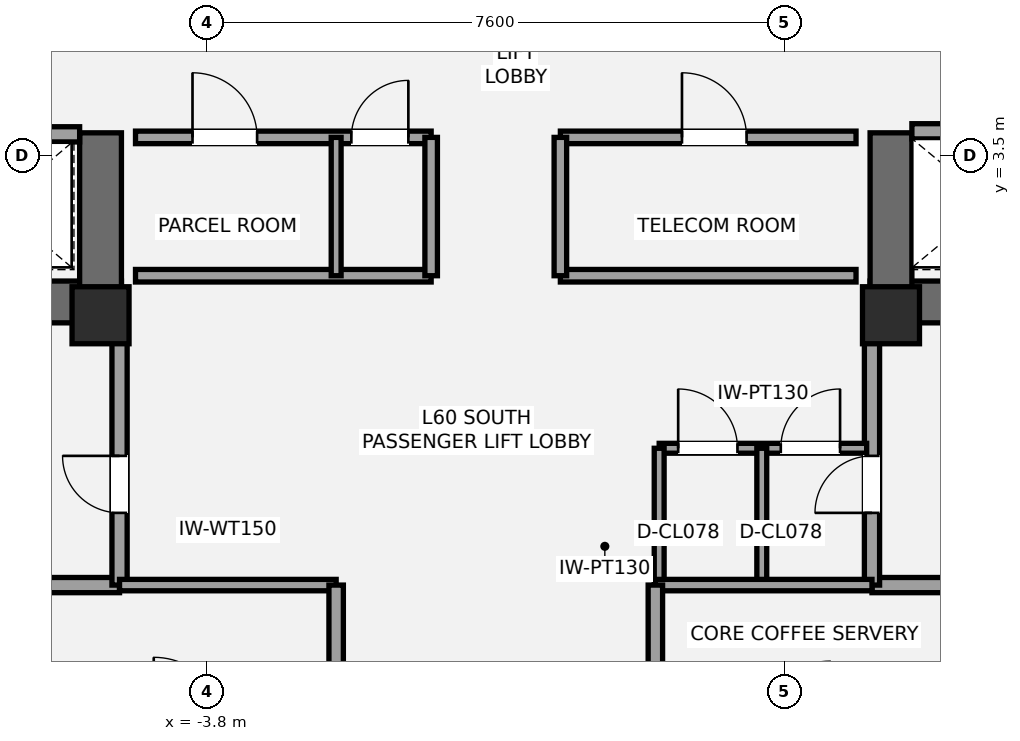
"""IFC4 building model, lengths in metres.
Left out: names, types, materials, properties, quantities, classifications, styles, units other than length and angle.
Written with IfcOpenShell. Run it as: python <this file> out.ifc"""

import sys

from ifc_helpers import new_model, si_unit, direction, frame, frame_2d, origin, origin_2d, place, context, subcontext, project, spatial, rectangle, extrude, element, fill, save


model = new_model("IFC4")
c1 = context("Model", 3, precision=1e-05, world=origin(), true_north=direction((0.0, 1.0)))
c2 = subcontext(c1, "Body", "Model", "MODEL_VIEW")
j1 = project(units=[si_unit("LENGTHUNIT", "METRE"), si_unit("PLANEANGLEUNIT", "RADIAN")], contexts=[c1])
p1 = place(None, origin())
s1 = spatial("IfcSite", under=j1, at=p1, CompositionType="ELEMENT")
p2 = place(p1, origin())
s2 = spatial("IfcBuilding", under=s1, at=p2, CompositionType="ELEMENT")
p3 = place(p2, frame((0.0, 0.0, 216.3)))
s3 = spatial("IfcBuildingStorey", under=s2, at=p3, CompositionType="ELEMENT", Elevation=216.3)
p4 = place(p3, frame((-4.925, 1.575, 0.0), z_axis=(0.0, 0.0, 1.0), x_axis=(-1.0, 0.0, 0.0)))
e1 = element("IfcWall", 1, at=p4, inside=s3, PredefinedType="SHEAR", context=c2, shape_type="SweptSolid", body=[
    extrude(rectangle(XDim=8.775, YDim=0.55, at=frame_2d((4.387, 0.0))), origin(), (0.0, 0.0, 1.0), 3.15),
])
p5 = place(p4, frame((5.375, 0.0, 0.0)))
e2 = element("IfcOpeningElement", 2, at=p5, cuts=e1, PredefinedType="OPENING", context=c2, shape_type="SweptSolid", body=[
    extrude(rectangle(XDim=1.05, YDim=2.15, at=frame_2d((0.525, 1.075))), frame((0.0, 0.285, 0.0), z_axis=(0.0, -1.0, 0.0), x_axis=(1.0, 0.0, 0.0)), (0.0, 0.0, 1.0), 0.57),
])
p6 = place(p4, frame((3.705, 0.0, 0.0)))
e3 = element("IfcOpeningElement", 3, at=p6, cuts=e1, PredefinedType="OPENING", context=c2, shape_type="SweptSolid", body=[
    extrude(rectangle(XDim=1.1, YDim=2.2, at=frame_2d((0.55, 1.1))), frame((0.0, 0.285, 0.0), z_axis=(0.0, -1.0, 0.0), x_axis=(1.0, 0.0, 0.0)), (0.0, 0.0, 1.0), 0.57),
])
p7 = place(p3, frame((-5.2, 1.3, 0.0), z_axis=(0.0, 0.0, 1.0), x_axis=(0.0, 1.0, 0.0)))
e4 = element("IfcWall", 4, at=p7, inside=s3, PredefinedType="SHEAR", context=c2, shape_type="SweptSolid", body=[
    extrude(rectangle(XDim=2.5, YDim=0.55, at=frame_2d((1.25, 0.0))), origin(), (0.0, 0.0, 1.0), 3.15),
])
p8 = place(p3, frame((13.7, 1.575, 0.0), z_axis=(0.0, 0.0, 1.0), x_axis=(-1.0, 0.0, 0.0)))
e5 = element("IfcWall", 5, at=p8, inside=s3, PredefinedType="SHEAR", context=c2, shape_type="SweptSolid", body=[
    extrude(rectangle(XDim=8.775, YDim=0.55, at=frame_2d((4.387, 0.0))), origin(), (0.0, 0.0, 1.0), 3.15),
])
p9 = place(p8, frame((2.35, 0.0, 0.0)))
e6 = element("IfcOpeningElement", 6, at=p9, cuts=e5, PredefinedType="OPENING", context=c2, shape_type="SweptSolid", body=[
    extrude(rectangle(XDim=1.05, YDim=2.15, at=frame_2d((0.525, 1.075))), frame((0.0, 0.285, 0.0), z_axis=(0.0, -1.0, 0.0), x_axis=(1.0, 0.0, 0.0)), (0.0, 0.0, 1.0), 0.57),
])
p10 = place(p8, frame((4.35, 0.0, 0.0)))
e7 = element("IfcOpeningElement", 7, at=p10, cuts=e5, PredefinedType="OPENING", context=c2, shape_type="SweptSolid", body=[
    extrude(rectangle(XDim=1.1, YDim=2.2, at=frame_2d((0.55, 1.1))), frame((0.0, 0.285, 0.0), z_axis=(0.0, -1.0, 0.0), x_axis=(1.0, 0.0, 0.0)), (0.0, 0.0, 1.0), 0.57),
])
p11 = place(p3, frame((5.2, 1.3, 0.0), z_axis=(0.0, 0.0, 1.0), x_axis=(0.0, 1.0, 0.0)))
e8 = element("IfcWall", 8, at=p11, inside=s3, PredefinedType="SHEAR", context=c2, shape_type="SweptSolid", body=[
    extrude(rectangle(XDim=2.5, YDim=0.55, at=frame_2d((1.25, 0.0))), origin(), (0.0, 0.0, 1.0), 3.15),
])
for number, where, z_axis, x_axis in (
    (9, (-5.2, 1.4, 0.0), (0.0, 0.0, 1.0), (1.0, 0.0, 0.0)),
    (10, (5.2, 1.4, 0.0), (0.0, 0.0, 1.0), (1.0, 0.0, 0.0)),
):
    element("IfcColumn", number, at=place(p3, frame(where, z_axis=z_axis, x_axis=x_axis)), inside=s3, PredefinedType="PILASTER", context=c2, shape_type="SweptSolid", body=[
        extrude(rectangle(XDim=0.75, YDim=0.75, at=origin_2d()), origin(), (0.0, 0.0, 1.0), 3.15),
    ])
p12 = place(p3, frame((-7.2, -2.15, 0.0), z_axis=(0.0, 0.0, 1.0), x_axis=(1.0, 0.0, 0.0)))
e11 = element("IfcWall", 11, at=p12, inside=s3, PredefinedType="SOLIDWALL", context=c2, shape_type="SweptSolid", body=[
    extrude(rectangle(XDim=2.25, YDim=0.2, at=frame_2d((1.125, 0.0))), origin(), (0.0, 0.0, 1.0), 2.423),
])
p13 = place(p3, frame((-4.95, -2.15, 0.0), z_axis=(0.0, 0.0, 1.0), x_axis=(0.0, 1.0, 0.0)))
e12 = element("IfcWall", 12, at=p13, inside=s3, PredefinedType="SOLIDWALL", context=c2, shape_type="SweptSolid", body=[
    extrude(rectangle(XDim=3.5, YDim=0.2, at=frame_2d((1.75, 0.0))), origin(), (0.0, 0.0, 1.0), 2.423),
])
p14 = place(p13, frame((0.95, 0.0, 0.0)))
e13 = element("IfcOpeningElement", 13, at=p14, cuts=e12, PredefinedType="OPENING", context=c2, shape_type="SweptSolid", body=[
    extrude(rectangle(XDim=0.75, YDim=2.1, at=frame_2d((0.375, 1.05))), frame((0.0, 0.11, 0.0), z_axis=(0.0, -1.0, 0.0), x_axis=(1.0, 0.0, 0.0)), (0.0, 0.0, 1.0), 0.22),
])
p15 = place(p3, frame((4.95, -2.15, 0.0), z_axis=(0.0, 0.0, 1.0), x_axis=(1.0, 0.0, 0.0)))
e14 = element("IfcWall", 14, at=p15, inside=s3, PredefinedType="SOLIDWALL", context=c2, shape_type="SweptSolid", body=[
    extrude(rectangle(XDim=2.25, YDim=0.2, at=frame_2d((1.125, 0.0))), origin(), (0.0, 0.0, 1.0), 2.97),
])
p16 = place(p3, frame((4.95, -2.15, 0.0), z_axis=(0.0, 0.0, 1.0), x_axis=(0.0, 1.0, 0.0)))
e15 = element("IfcWall", 15, at=p16, inside=s3, PredefinedType="SOLIDWALL", context=c2, shape_type="SweptSolid", body=[
    extrude(rectangle(XDim=3.5, YDim=0.2, at=frame_2d((1.75, 0.0))), origin(), (0.0, 0.0, 1.0), 2.423),
])
p17 = place(p16, frame((0.95, 0.0, 0.0)))
e16 = element("IfcOpeningElement", 16, at=p17, cuts=e15, PredefinedType="OPENING", context=c2, shape_type="SweptSolid", body=[
    extrude(rectangle(XDim=0.75, YDim=2.1, at=frame_2d((0.375, 1.05))), frame((0.0, 0.11, 0.0), z_axis=(0.0, -1.0, 0.0), x_axis=(1.0, 0.0, 0.0)), (0.0, 0.0, 1.0), 0.22),
])
p18 = place(p3, frame((2.15, -0.35, 0.0), z_axis=(0.0, 0.0, 1.0), x_axis=(1.0, 0.0, 0.0)))
e17 = element("IfcWall", 17, at=p18, inside=s3, PredefinedType="PARTITIONING", context=c2, shape_type="SweptSolid", body=[
    extrude(rectangle(XDim=2.73, YDim=0.13, at=frame_2d((1.365, 0.0))), origin(), (0.0, 0.0, 1.0), 2.97),
])
p19 = place(p18, frame((0.25, 0.0, 0.0)))
e18 = element("IfcOpeningElement", 18, at=p19, cuts=e17, PredefinedType="OPENING", context=c2, shape_type="SweptSolid", body=[
    extrude(rectangle(XDim=0.78, YDim=2.1, at=frame_2d((0.39, 1.05))), frame((0.0, 0.075, 0.0), z_axis=(0.0, -1.0, 0.0), x_axis=(1.0, 0.0, 0.0)), (0.0, 0.0, 1.0), 0.15),
])
p20 = place(p18, frame((1.6, 0.0, 0.0)))
e19 = element("IfcOpeningElement", 19, at=p20, cuts=e17, PredefinedType="OPENING", context=c2, shape_type="SweptSolid", body=[
    extrude(rectangle(XDim=0.78, YDim=2.1, at=frame_2d((0.39, 1.05))), frame((0.0, 0.075, 0.0), z_axis=(0.0, -1.0, 0.0), x_axis=(1.0, 0.0, 0.0)), (0.0, 0.0, 1.0), 0.15),
])
for number, where, z_axis, x_axis in (
    (20, (2.15, -2.15, 0.0), (0.0, 0.0, 1.0), (0.0, 1.0, 0.0)),
    (21, (3.5, -2.15, 0.0), (0.0, 0.0, 1.0), (0.0, 1.0, 0.0)),
):
    element("IfcWall", number, at=place(p3, frame(where, z_axis=z_axis, x_axis=x_axis)), inside=s3, PredefinedType="PARTITIONING", context=c2, shape_type="SweptSolid", body=[
        extrude(rectangle(XDim=1.8, YDim=0.13, at=frame_2d((0.9, 0.0))), origin(), (0.0, 0.0, 1.0), 2.97),
    ])
p21 = place(p3, frame((-9.78, 3.78, 0.0), z_axis=(0.0, 0.0, 1.0), x_axis=(1.0, 0.0, 0.0)))
e22 = element("IfcWall", 22, at=p21, inside=s3, PredefinedType="SOLIDWALL", context=c2, shape_type="SweptSolid", body=[
    extrude(rectangle(XDim=4.305, YDim=0.2, at=frame_2d((2.152, 0.0))), origin(), (0.0, 0.0, 1.0), 2.97),
])
p22 = place(p21, frame((2.72, 0.0, 0.0)))
e23 = element("IfcOpeningElement", 23, at=p22, cuts=e22, PredefinedType="OPENING", context=c2, shape_type="SweptSolid", body=[
    extrude(rectangle(XDim=1.1, YDim=2.2, at=frame_2d((0.55, 1.1))), frame((0.0, 0.11, 0.0), z_axis=(0.0, -1.0, 0.0), x_axis=(1.0, 0.0, 0.0)), (0.0, 0.0, 1.0), 0.22),
])
p23 = place(p3, frame((5.475, 3.82, 0.0), z_axis=(0.0, 0.0, 1.0), x_axis=(1.0, 0.0, 0.0)))
e24 = element("IfcWall", 24, at=p23, inside=s3, PredefinedType="SOLIDWALL", context=c2, shape_type="SweptSolid", body=[
    extrude(rectangle(XDim=4.305, YDim=0.2, at=frame_2d((2.152, 0.0))), origin(), (0.0, 0.0, 1.0), 2.97),
])
p24 = place(p23, frame((0.65, 0.0, 0.0)))
e25 = element("IfcOpeningElement", 25, at=p24, cuts=e24, PredefinedType="OPENING", context=c2, shape_type="SweptSolid", body=[
    extrude(rectangle(XDim=1.2, YDim=2.2, at=frame_2d((0.6, 1.1))), frame((0.0, 0.11, 0.0), z_axis=(0.0, -1.0, 0.0), x_axis=(1.0, 0.0, 0.0)), (0.0, 0.0, 1.0), 0.22),
])
p25 = place(p3, frame((-4.74, 1.92, 0.0), z_axis=(0.0, 0.0, 1.0), x_axis=(1.0, 0.0, 0.0)))
e26 = element("IfcWall", 26, at=p25, inside=s3, PredefinedType="PARTITIONING", context=c2, shape_type="SweptSolid", body=[
    extrude(rectangle(XDim=3.89, YDim=0.165, at=frame_2d((1.945, 0.0))), origin(), (0.0, 0.0, 1.0), 2.11),
])
p26 = place(p3, frame((-4.74, 3.74, 0.0), z_axis=(0.0, 0.0, 1.0), x_axis=(1.0, 0.0, 0.0)))
e27 = element("IfcWall", 27, at=p26, inside=s3, PredefinedType="PARTITIONING", context=c2, shape_type="SweptSolid", body=[
    extrude(rectangle(XDim=3.89, YDim=0.165, at=frame_2d((1.945, 0.0))), origin(), (0.0, 0.0, 1.0), 2.97),
])
p27 = place(p26, frame((0.75, 0.0, 0.0)))
e28 = element("IfcOpeningElement", 28, at=p27, cuts=e27, PredefinedType="OPENING", context=c2, shape_type="SweptSolid", body=[
    extrude(rectangle(XDim=0.85, YDim=2.1, at=frame_2d((0.425, 1.05))), frame((0.0, 0.093, 0.0), z_axis=(0.0, -1.0, 0.0), x_axis=(1.0, 0.0, 0.0)), (0.0, 0.0, 1.0), 0.185),
])
p28 = place(p26, frame((2.84, 0.0, 0.0)))
e29 = element("IfcOpeningElement", 29, at=p28, cuts=e27, PredefinedType="OPENING", context=c2, shape_type="SweptSolid", body=[
    extrude(rectangle(XDim=0.75, YDim=2.1, at=frame_2d((0.375, 1.05))), frame((0.0, 0.093, 0.0), z_axis=(0.0, -1.0, 0.0), x_axis=(1.0, 0.0, 0.0)), (0.0, 0.0, 1.0), 0.185),
])
p29 = place(p3, frame((-0.85, 1.92, 0.0), z_axis=(0.0, 0.0, 1.0), x_axis=(0.0, 1.0, 0.0)))
e30 = element("IfcWall", 30, at=p29, inside=s3, PredefinedType="PARTITIONING", context=c2, shape_type="SweptSolid", body=[
    extrude(rectangle(XDim=1.82, YDim=0.165, at=frame_2d((0.91, 0.0))), origin(), (0.0, 0.0, 1.0), 2.97),
])
p30 = place(p3, frame((0.85, 1.92, 0.0), z_axis=(0.0, 0.0, 1.0), x_axis=(1.0, 0.0, 0.0)))
e31 = element("IfcWall", 31, at=p30, inside=s3, PredefinedType="PARTITIONING", context=c2, shape_type="SweptSolid", body=[
    extrude(rectangle(XDim=3.89, YDim=0.165, at=frame_2d((1.945, 0.0))), origin(), (0.0, 0.0, 1.0), 2.11),
])
p31 = place(p3, frame((0.85, 3.74, 0.0), z_axis=(0.0, 0.0, 1.0), x_axis=(1.0, 0.0, 0.0)))
e32 = element("IfcWall", 32, at=p31, inside=s3, PredefinedType="PARTITIONING", context=c2, shape_type="SweptSolid", body=[
    extrude(rectangle(XDim=3.89, YDim=0.165, at=frame_2d((1.945, 0.0))), origin(), (0.0, 0.0, 1.0), 2.97),
])
p32 = place(p31, frame((1.6, 0.0, 0.0)))
e33 = element("IfcOpeningElement", 33, at=p32, cuts=e32, PredefinedType="OPENING", context=c2, shape_type="SweptSolid", body=[
    extrude(rectangle(XDim=0.85, YDim=2.1, at=frame_2d((0.425, 1.05))), frame((0.0, 0.093, 0.0), z_axis=(0.0, -1.0, 0.0), x_axis=(1.0, 0.0, 0.0)), (0.0, 0.0, 1.0), 0.185),
])
p33 = place(p3, frame((0.85, 1.92, 0.0), z_axis=(0.0, 0.0, 1.0), x_axis=(0.0, 1.0, 0.0)))
e34 = element("IfcWall", 34, at=p33, inside=s3, PredefinedType="PARTITIONING", context=c2, shape_type="SweptSolid", body=[
    extrude(rectangle(XDim=1.82, YDim=0.165, at=frame_2d((0.91, 0.0))), origin(), (0.0, 0.0, 1.0), 2.97),
])
p34 = place(p3, frame((-2.1, 1.92, 0.0), z_axis=(0.0, 0.0, 1.0), x_axis=(0.0, 1.0, 0.0)))
e35 = element("IfcWall", 35, at=p34, inside=s3, PredefinedType="PARTITIONING", context=c2, shape_type="SweptSolid", body=[
    extrude(rectangle(XDim=1.82, YDim=0.13, at=frame_2d((0.91, 0.0))), origin(), (0.0, 0.0, 1.0), 2.97),
])
p35 = place(p3, frame((-4.95, -2.15, 0.0), z_axis=(0.0, 0.0, 1.0), x_axis=(1.0, 0.0, 0.0)))
e36 = element("IfcWall", 36, at=p35, inside=s3, PredefinedType="PLUMBINGWALL", context=c2, shape_type="SweptSolid", body=[
    extrude(rectangle(XDim=2.85, YDim=0.15, at=frame_2d((1.425, 0.0))), origin(), (0.0, 0.0, 1.0), 2.97),
])
p36 = place(p3, frame((-2.1, -4.05, 0.0), z_axis=(0.0, 0.0, 1.0), x_axis=(0.0, 1.0, 0.0)))
e37 = element("IfcWall", 37, at=p36, inside=s3, PredefinedType="PLUMBINGWALL", context=c2, shape_type="SweptSolid", body=[
    extrude(rectangle(XDim=1.9, YDim=0.19, at=frame_2d((0.95, 0.0))), origin(), (0.0, 0.0, 1.0), 2.423),
])
p37 = place(p3, frame((2.1, -2.15, 0.0), z_axis=(0.0, 0.0, 1.0), x_axis=(1.0, 0.0, 0.0)))
e38 = element("IfcWall", 38, at=p37, inside=s3, PredefinedType="PLUMBINGWALL", context=c2, shape_type="SweptSolid", body=[
    extrude(rectangle(XDim=2.85, YDim=0.15, at=frame_2d((1.425, 0.0))), origin(), (0.0, 0.0, 1.0), 2.97),
])
p38 = place(p3, frame((2.1, -4.05, 0.0), z_axis=(0.0, 0.0, 1.0), x_axis=(0.0, 1.0, 0.0)))
e39 = element("IfcWall", 39, at=p38, inside=s3, PredefinedType="PLUMBINGWALL", context=c2, shape_type="SweptSolid", body=[
    extrude(rectangle(XDim=1.9, YDim=0.19, at=frame_2d((0.95, 0.0))), origin(), (0.0, 0.0, 1.0), 2.97),
])
p39 = place(p14, origin())
e40 = element("IfcDoor", 40, at=p39, inside=s3, OperationType="SINGLE_SWING_RIGHT", PredefinedType="DOOR", context=c2, shape_type="SweptSolid", body=[
    extrude(rectangle(XDim=0.75, YDim=2.1, at=frame_2d((0.375, 1.05))), frame((0.0, 0.025, 0.0), z_axis=(0.0, -1.0, 0.0), x_axis=(1.0, 0.0, 0.0)), (0.0, 0.0, 1.0), 0.05),
])
fill(e13, e40)
p40 = place(p17, origin())
e41 = element("IfcDoor", 41, at=p40, inside=s3, OperationType="SINGLE_SWING_LEFT", PredefinedType="DOOR", context=c2, shape_type="SweptSolid", body=[
    extrude(rectangle(XDim=0.75, YDim=2.1, at=frame_2d((0.375, 1.05))), frame((0.0, 0.025, 0.0), z_axis=(0.0, -1.0, 0.0), x_axis=(1.0, 0.0, 0.0)), (0.0, 0.0, 1.0), 0.05),
])
fill(e16, e41)
p41 = place(p19, origin())
e42 = element("IfcDoor", 42, at=p41, inside=s3, OperationType="SINGLE_SWING_LEFT", PredefinedType="DOOR", context=c2, shape_type="SweptSolid", body=[
    extrude(rectangle(XDim=0.78, YDim=2.1, at=frame_2d((0.39, 1.05))), frame((0.0, 0.025, 0.0), z_axis=(0.0, -1.0, 0.0), x_axis=(1.0, 0.0, 0.0)), (0.0, 0.0, 1.0), 0.05),
])
fill(e18, e42)
p42 = place(p20, origin())
e43 = element("IfcDoor", 43, at=p42, inside=s3, OperationType="SINGLE_SWING_RIGHT", PredefinedType="DOOR", context=c2, shape_type="SweptSolid", body=[
    extrude(rectangle(XDim=0.78, YDim=2.1, at=frame_2d((0.39, 1.05))), frame((0.0, 0.025, 0.0), z_axis=(0.0, -1.0, 0.0), x_axis=(1.0, 0.0, 0.0)), (0.0, 0.0, 1.0), 0.05),
])
fill(e19, e43)
p43 = place(p27, origin())
e44 = element("IfcDoor", 44, at=p43, inside=s3, OperationType="SINGLE_SWING_LEFT", PredefinedType="DOOR", context=c2, shape_type="SweptSolid", body=[
    extrude(rectangle(XDim=0.85, YDim=2.1, at=frame_2d((0.425, 1.05))), frame((0.0, 0.025, 0.0), z_axis=(0.0, -1.0, 0.0), x_axis=(1.0, 0.0, 0.0)), (0.0, 0.0, 1.0), 0.05),
])
fill(e28, e44)
p44 = place(p28, origin())
e45 = element("IfcDoor", 45, at=p44, inside=s3, OperationType="SINGLE_SWING_RIGHT", PredefinedType="DOOR", context=c2, shape_type="SweptSolid", body=[
    extrude(rectangle(XDim=0.75, YDim=2.1, at=frame_2d((0.375, 1.05))), frame((0.0, 0.025, 0.0), z_axis=(0.0, -1.0, 0.0), x_axis=(1.0, 0.0, 0.0)), (0.0, 0.0, 1.0), 0.05),
])
fill(e29, e45)
p45 = place(p32, origin())
e46 = element("IfcDoor", 46, at=p45, inside=s3, OperationType="SINGLE_SWING_LEFT", PredefinedType="DOOR", context=c2, shape_type="SweptSolid", body=[
    extrude(rectangle(XDim=0.85, YDim=2.1, at=frame_2d((0.425, 1.05))), frame((0.0, 0.025, 0.0), z_axis=(0.0, -1.0, 0.0), x_axis=(1.0, 0.0, 0.0)), (0.0, 0.0, 1.0), 0.05),
])
fill(e33, e46)
save(model, sys.argv[1])
